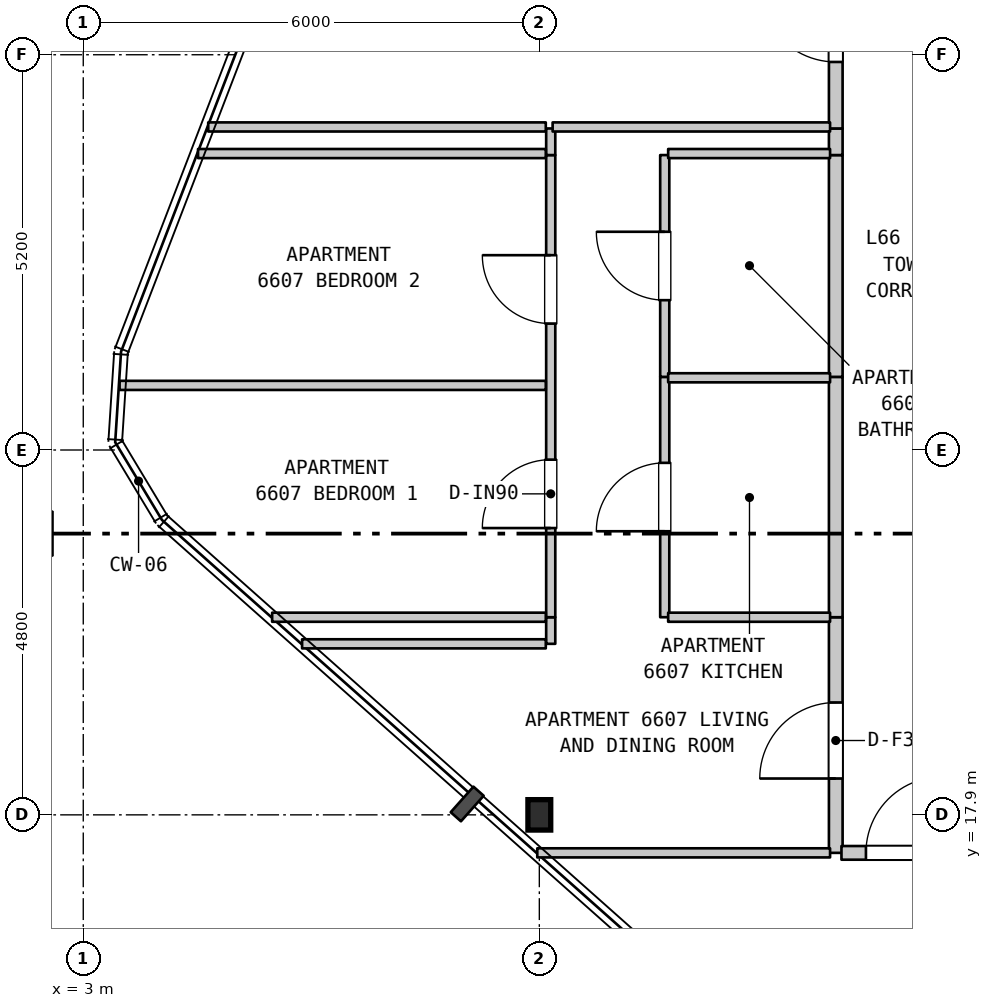
"""IFC4 building model, lengths in metres.
Left out: names, types, materials, properties, quantities, classifications, styles, units other than length and angle.
Written with IfcOpenShell. Run it as: python <this file> out.ifc"""

import sys

from ifc_helpers import new_model, si_unit, direction, frame, frame_2d, origin, origin_2d, place, context, subcontext, project, spatial, rectangle, i_section, extrude, element, fill, save


model = new_model("IFC4")
c1 = context("Model", 3, precision=1e-05, world=origin(), true_north=direction((0.0, 1.0)))
c2 = subcontext(c1, "Body", "Model", "MODEL_VIEW")
j1 = project(units=[si_unit("LENGTHUNIT", "METRE"), si_unit("PLANEANGLEUNIT", "RADIAN")], contexts=[c1])
p1 = place(None, origin())
s1 = spatial("IfcSite", under=j1, at=p1, CompositionType="ELEMENT")
p2 = place(p1, origin())
s2 = spatial("IfcBuilding", under=s1, at=p2, CompositionType="ELEMENT")
p3 = place(p2, frame((0.0, 0.0, 265.8)))
s3 = spatial("IfcBuildingStorey", under=s2, at=p3, CompositionType="ELEMENT", Elevation=265.8)
p4 = place(p3, frame((9.0, 17.9, 0.0), z_axis=(0.0, 0.0, 1.0), x_axis=(1.0, 0.0, 0.0)))
e1 = element("IfcColumn", 1, at=p4, inside=s3, PredefinedType="COLUMN", context=c2, shape_type="SweptSolid", body=[
    extrude(i_section(OverallWidth=0.3, OverallDepth=0.4, WebThickness=0.013, FlangeThickness=0.024, FilletRadius=0.027, at=origin_2d()), origin(), (0.0, 0.0, 1.0), 3.7),
])
p5 = place(p3, frame((9.15, 20.15, 0.0), z_axis=(0.0, 0.0, 1.0), x_axis=(0.0, 1.0, 0.0)))
e2 = element("IfcWall", 2, at=p5, inside=s3, PredefinedType="PARTITIONING", context=c2, shape_type="SweptSolid", body=[
    extrude(rectangle(XDim=0.35, YDim=0.12, at=frame_2d((0.175, 0.0))), origin(), (0.0, 0.0, 1.0), 3.39),
])
p6 = place(p3, frame((9.15, 20.5, 0.0), z_axis=(0.0, 0.0, 1.0), x_axis=(0.0, 1.0, 0.0)))
e3 = element("IfcWall", 3, at=p6, inside=s3, PredefinedType="PARTITIONING", context=c2, shape_type="SweptSolid", body=[
    extrude(rectangle(XDim=6.08, YDim=0.12, at=frame_2d((3.04, 0.0))), origin(), (0.0, 0.0, 1.0), 2.79),
])
p7 = place(p6, frame((1.173, 0.0, 0.0)))
e4 = element("IfcOpeningElement", 4, at=p7, cuts=e3, PredefinedType="OPENING", context=c2, shape_type="SweptSolid", body=[
    extrude(rectangle(XDim=0.9, YDim=2.15, at=frame_2d((0.45, 1.075))), frame((0.0, 0.07, 0.0), z_axis=(0.0, -1.0, 0.0), x_axis=(1.0, 0.0, 0.0)), (0.0, 0.0, 1.0), 0.14),
])
p8 = place(p6, frame((3.863, 0.0, 0.0)))
e5 = element("IfcOpeningElement", 5, at=p8, cuts=e3, PredefinedType="OPENING", context=c2, shape_type="SweptSolid", body=[
    extrude(rectangle(XDim=0.9, YDim=2.15, at=frame_2d((0.45, 1.075))), frame((0.0, 0.07, 0.0), z_axis=(0.0, -1.0, 0.0), x_axis=(1.0, 0.0, 0.0)), (0.0, 0.0, 1.0), 0.14),
])
p9 = place(p3, frame((9.15, 26.58, 0.0), z_axis=(0.0, 0.0, 1.0), x_axis=(0.0, 1.0, 0.0)))
e6 = element("IfcWall", 6, at=p9, inside=s3, PredefinedType="PARTITIONING", context=c2, shape_type="SweptSolid", body=[
    extrude(rectangle(XDim=0.35, YDim=0.12, at=frame_2d((0.175, 0.0))), origin(), (0.0, 0.0, 1.0), 3.39),
])
p10 = place(p3, frame((10.65, 20.5, 0.0), z_axis=(0.0, 0.0, 1.0), x_axis=(0.0, 1.0, 0.0)))
e7 = element("IfcWall", 7, at=p10, inside=s3, PredefinedType="PARTITIONING", context=c2, shape_type="SweptSolid", body=[
    extrude(rectangle(XDim=3.162, YDim=0.12, at=frame_2d((1.581, 0.0))), origin(), (0.0, 0.0, 1.0), 3.39),
])
p11 = place(p10, frame((1.131, 0.0, 0.0)))
e8 = element("IfcOpeningElement", 8, at=p11, cuts=e7, PredefinedType="OPENING", context=c2, shape_type="SweptSolid", body=[
    extrude(rectangle(XDim=0.9, YDim=2.15, at=frame_2d((0.45, 1.075))), frame((0.0, 0.07, 0.0), z_axis=(0.0, -1.0, 0.0), x_axis=(1.0, 0.0, 0.0)), (0.0, 0.0, 1.0), 0.14),
])
p12 = place(p3, frame((10.65, 23.662, 0.0), z_axis=(0.0, 0.0, 1.0), x_axis=(0.0, 1.0, 0.0)))
e9 = element("IfcWall", 9, at=p12, inside=s3, PredefinedType="PARTITIONING", context=c2, shape_type="SweptSolid", body=[
    extrude(rectangle(XDim=2.918, YDim=0.12, at=frame_2d((1.459, 0.0))), origin(), (0.0, 0.0, 1.0), 3.39),
])
p13 = place(p12, frame((1.009, 0.0, 0.0)))
e10 = element("IfcOpeningElement", 10, at=p13, cuts=e9, PredefinedType="OPENING", context=c2, shape_type="SweptSolid", body=[
    extrude(rectangle(XDim=0.9, YDim=2.1, at=frame_2d((0.45, 1.05))), frame((0.0, 0.07, 0.0), z_axis=(0.0, -1.0, 0.0), x_axis=(1.0, 0.0, 0.0)), (0.0, 0.0, 1.0), 0.14),
])
p14 = place(p3, frame((12.9, 17.4, 0.0), z_axis=(0.0, 0.0, 1.0), x_axis=(0.0, 1.0, 0.0)))
e11 = element("IfcWall", 11, at=p14, inside=s3, PredefinedType="STANDARD", context=c2, shape_type="SweptSolid", body=[
    extrude(rectangle(XDim=3.1, YDim=0.18, at=frame_2d((1.55, 0.0))), origin(), (0.0, 0.0, 1.0), 3.39),
])
p15 = place(p14, frame((0.978, 0.0, 0.0)))
e12 = element("IfcOpeningElement", 12, at=p15, cuts=e11, PredefinedType="OPENING", context=c2, shape_type="SweptSolid", body=[
    extrude(rectangle(XDim=1.0, YDim=2.15, at=frame_2d((0.5, 1.075))), frame((0.0, 0.1, 0.0), z_axis=(0.0, -1.0, 0.0), x_axis=(1.0, 0.0, 0.0)), (0.0, 0.0, 1.0), 0.2),
])
p16 = place(p3, frame((12.9, 20.5, 0.0), z_axis=(0.0, 0.0, 1.0), x_axis=(0.0, 1.0, 0.0)))
e13 = element("IfcWall", 13, at=p16, inside=s3, PredefinedType="STANDARD", context=c2, shape_type="SweptSolid", body=[
    extrude(rectangle(XDim=3.162, YDim=0.18, at=frame_2d((1.581, 0.0))), origin(), (0.0, 0.0, 1.0), 3.39),
])
p17 = place(p3, frame((12.9, 23.662, 0.0), z_axis=(0.0, 0.0, 1.0), x_axis=(0.0, 1.0, 0.0)))
e14 = element("IfcWall", 14, at=p17, inside=s3, PredefinedType="STANDARD", context=c2, shape_type="SweptSolid", body=[
    extrude(rectangle(XDim=2.918, YDim=0.18, at=frame_2d((1.459, 0.0))), origin(), (0.0, 0.0, 1.0), 3.39),
])
p18 = place(p3, frame((12.9, 26.58, 0.0), z_axis=(0.0, 0.0, 1.0), x_axis=(0.0, 1.0, 0.0)))
e15 = element("IfcWall", 15, at=p18, inside=s3, PredefinedType="STANDARD", context=c2, shape_type="SweptSolid", body=[
    extrude(rectangle(XDim=0.35, YDim=0.18, at=frame_2d((0.175, 0.0))), origin(), (0.0, 0.0, 1.0), 3.39),
])
p19 = place(p3, frame((12.9, 26.93, 0.0), z_axis=(0.0, 0.0, 1.0), x_axis=(0.0, 1.0, 0.0)))
e16 = element("IfcWall", 16, at=p19, inside=s3, PredefinedType="STANDARD", context=c2, shape_type="SweptSolid", body=[
    extrude(rectangle(XDim=2.75, YDim=0.18, at=frame_2d((1.375, 0.0))), origin(), (0.0, 0.0, 1.0), 3.39),
])
p20 = place(p19, frame((0.875, 0.0, 0.0)))
e17 = element("IfcOpeningElement", 17, at=p20, cuts=e16, PredefinedType="OPENING", context=c2, shape_type="SweptSolid", body=[
    extrude(rectangle(XDim=1.0, YDim=2.15, at=frame_2d((0.5, 1.075))), frame((0.0, 0.1, 0.0), z_axis=(0.0, -1.0, 0.0), x_axis=(1.0, 0.0, 0.0)), (0.0, 0.0, 1.0), 0.2),
])
p21 = place(p3, frame((8.973, 17.4, 0.0), z_axis=(0.0, 0.0, 1.0), x_axis=(1.0, 0.0, 0.0)))
e18 = element("IfcWall", 18, at=p21, inside=s3, PredefinedType="PARTITIONING", context=c2, shape_type="SweptSolid", body=[
    extrude(rectangle(XDim=3.852, YDim=0.12, at=frame_2d((1.926, 0.0))), origin(), (0.0, 0.0, 1.0), 3.39),
])
p22 = place(p3, frame((12.975, 17.4, 0.0), z_axis=(0.0, 0.0, 1.0), x_axis=(1.0, 0.0, 0.0)))
e19 = element("IfcWall", 19, at=p22, inside=s3, PredefinedType="STANDARD", context=c2, shape_type="SweptSolid", body=[
    extrude(rectangle(XDim=3.68, YDim=0.18, at=frame_2d((1.84, 0.0))), origin(), (0.0, 0.0, 1.0), 3.39),
])
p23 = place(p22, frame((0.322, 0.0, 0.0)))
e20 = element("IfcOpeningElement", 20, at=p23, cuts=e19, PredefinedType="OPENING", context=c2, shape_type="SweptSolid", body=[
    extrude(rectangle(XDim=1.0, YDim=2.15, at=frame_2d((0.5, 1.075))), frame((0.0, 0.1, 0.0), z_axis=(0.0, -1.0, 0.0), x_axis=(1.0, 0.0, 0.0)), (0.0, 0.0, 1.0), 0.2),
])
p24 = place(p3, frame((5.879, 20.15, 0.0), z_axis=(0.0, 0.0, 1.0), x_axis=(1.0, 0.0, 0.0)))
e21 = element("IfcWall", 21, at=p24, inside=s3, PredefinedType="PARTITIONING", context=c2, shape_type="SweptSolid", body=[
    extrude(rectangle(XDim=3.206, YDim=0.12, at=frame_2d((1.603, 0.0))), origin(), (0.0, 0.0, 1.0), 3.39),
])
p25 = place(p3, frame((5.485, 20.5, 0.0), z_axis=(0.0, 0.0, 1.0), x_axis=(1.0, 0.0, 0.0)))
e22 = element("IfcWall", 22, at=p25, inside=s3, PredefinedType="PARTITIONING", context=c2, shape_type="SweptSolid", body=[
    extrude(rectangle(XDim=3.6, YDim=0.12, at=frame_2d((1.8, 0.0))), origin(), (0.0, 0.0, 1.0), 3.39),
])
p26 = place(p3, frame((10.695, 20.5, 0.0), z_axis=(0.0, 0.0, 1.0), x_axis=(1.0, 0.0, 0.0)))
e23 = element("IfcWall", 23, at=p26, inside=s3, PredefinedType="PARTITIONING", context=c2, shape_type="SweptSolid", body=[
    extrude(rectangle(XDim=2.13, YDim=0.12, at=frame_2d((1.065, 0.0))), origin(), (0.0, 0.0, 1.0), 3.39),
])
p27 = place(p3, frame((3.478, 23.55, 0.0), z_axis=(0.0, 0.0, 1.0), x_axis=(1.0, 0.0, 0.0)))
e24 = element("IfcWall", 24, at=p27, inside=s3, PredefinedType="PARTITIONING", context=c2, shape_type="SweptSolid", body=[
    extrude(rectangle(XDim=5.607, YDim=0.12, at=frame_2d((2.803, 0.0))), origin(), (0.0, 0.0, 1.0), 3.39),
])
p28 = place(p3, frame((10.695, 23.65, 0.0), z_axis=(0.0, 0.0, 1.0), x_axis=(1.0, 0.0, 0.0)))
e25 = element("IfcWall", 25, at=p28, inside=s3, PredefinedType="PARTITIONING", context=c2, shape_type="SweptSolid", body=[
    extrude(rectangle(XDim=2.13, YDim=0.12, at=frame_2d((1.065, 0.0))), origin(), (0.0, 0.0, 1.0), 3.39),
])
p29 = place(p3, frame((4.51, 26.6, 0.0), z_axis=(0.0, 0.0, 1.0), x_axis=(1.0, 0.0, 0.0)))
e26 = element("IfcWall", 26, at=p29, inside=s3, PredefinedType="PARTITIONING", context=c2, shape_type="SweptSolid", body=[
    extrude(rectangle(XDim=4.575, YDim=0.12, at=frame_2d((2.288, 0.0))), origin(), (0.0, 0.0, 1.0), 3.39),
])
p30 = place(p3, frame((10.695, 26.6, 0.0), z_axis=(0.0, 0.0, 1.0), x_axis=(1.0, 0.0, 0.0)))
e27 = element("IfcWall", 27, at=p30, inside=s3, PredefinedType="PARTITIONING", context=c2, shape_type="SweptSolid", body=[
    extrude(rectangle(XDim=2.13, YDim=0.12, at=frame_2d((1.065, 0.0))), origin(), (0.0, 0.0, 1.0), 3.39),
])
p31 = place(p3, frame((4.644, 26.95, 0.0), z_axis=(0.0, 0.0, 1.0), x_axis=(1.0, 0.0, 0.0)))
e28 = element("IfcWall", 28, at=p31, inside=s3, PredefinedType="PARTITIONING", context=c2, shape_type="SweptSolid", body=[
    extrude(rectangle(XDim=4.441, YDim=0.12, at=frame_2d((2.22, 0.0))), origin(), (0.0, 0.0, 1.0), 3.39),
])
p32 = place(p3, frame((9.175, 26.95, 0.0), z_axis=(0.0, 0.0, 1.0), x_axis=(1.0, 0.0, 0.0)))
e29 = element("IfcWall", 29, at=p32, inside=s3, PredefinedType="PARTITIONING", context=c2, shape_type="SweptSolid", body=[
    extrude(rectangle(XDim=3.65, YDim=0.12, at=frame_2d((1.825, 0.0))), origin(), (0.0, 0.0, 1.0), 3.39),
])
p33 = place(p7, origin())
e30 = element("IfcDoor", 30, at=p33, inside=s3, OperationType="SINGLE_SWING_LEFT", PredefinedType="DOOR", context=c2, shape_type="SweptSolid", body=[
    extrude(rectangle(XDim=0.9, YDim=2.15, at=frame_2d((0.45, 1.075))), frame((0.0, 0.025, 0.0), z_axis=(0.0, -1.0, 0.0), x_axis=(1.0, 0.0, 0.0)), (0.0, 0.0, 1.0), 0.05),
])
fill(e4, e30)
p34 = place(p8, origin())
e31 = element("IfcDoor", 31, at=p34, inside=s3, OperationType="SINGLE_SWING_RIGHT", PredefinedType="DOOR", context=c2, shape_type="SweptSolid", body=[
    extrude(rectangle(XDim=0.9, YDim=2.15, at=frame_2d((0.45, 1.075))), frame((0.0, 0.025, 0.0), z_axis=(0.0, -1.0, 0.0), x_axis=(1.0, 0.0, 0.0)), (0.0, 0.0, 1.0), 0.05),
])
fill(e5, e31)
p35 = place(p11, origin())
e32 = element("IfcDoor", 32, at=p35, inside=s3, OperationType="SINGLE_SWING_LEFT", PredefinedType="DOOR", context=c2, shape_type="SweptSolid", body=[
    extrude(rectangle(XDim=0.9, YDim=2.15, at=frame_2d((0.45, 1.075))), frame((0.0, 0.025, 0.0), z_axis=(0.0, -1.0, 0.0), x_axis=(1.0, 0.0, 0.0)), (0.0, 0.0, 1.0), 0.05),
])
fill(e8, e32)
p36 = place(p13, origin())
e33 = element("IfcDoor", 33, at=p36, inside=s3, OperationType="SINGLE_SWING_RIGHT", PredefinedType="DOOR", context=c2, shape_type="SweptSolid", body=[
    extrude(rectangle(XDim=0.9, YDim=2.1, at=frame_2d((0.45, 1.05))), frame((0.0, 0.025, 0.0), z_axis=(0.0, -1.0, 0.0), x_axis=(1.0, 0.0, 0.0)), (0.0, 0.0, 1.0), 0.05),
])
fill(e10, e33)
p37 = place(p15, origin())
e34 = element("IfcDoor", 34, at=p37, inside=s3, OperationType="SINGLE_SWING_LEFT", PredefinedType="DOOR", context=c2, shape_type="SweptSolid", body=[
    extrude(rectangle(XDim=1.0, YDim=2.15, at=frame_2d((0.5, 1.075))), frame((0.0, 0.025, 0.0), z_axis=(0.0, -1.0, 0.0), x_axis=(1.0, 0.0, 0.0)), (0.0, 0.0, 1.0), 0.05),
])
fill(e12, e34)
p38 = place(p20, origin())
e35 = element("IfcDoor", 35, at=p38, inside=s3, OperationType="SINGLE_SWING_RIGHT", PredefinedType="DOOR", context=c2, shape_type="SweptSolid", body=[
    extrude(rectangle(XDim=1.0, YDim=2.15, at=frame_2d((0.5, 1.075))), frame((0.0, 0.025, 0.0), z_axis=(0.0, -1.0, 0.0), x_axis=(1.0, 0.0, 0.0)), (0.0, 0.0, 1.0), 0.05),
])
fill(e17, e35)
p39 = place(p23, origin())
e36 = element("IfcDoor", 36, at=p39, inside=s3, OperationType="SINGLE_SWING_RIGHT", PredefinedType="DOOR", context=c2, shape_type="SweptSolid", body=[
    extrude(rectangle(XDim=1.0, YDim=2.15, at=frame_2d((0.5, 1.075))), frame((0.0, 0.025, 0.0), z_axis=(0.0, -1.0, 0.0), x_axis=(1.0, 0.0, 0.0)), (0.0, 0.0, 1.0), 0.05),
])
fill(e20, e36)
save(model, sys.argv[1])
